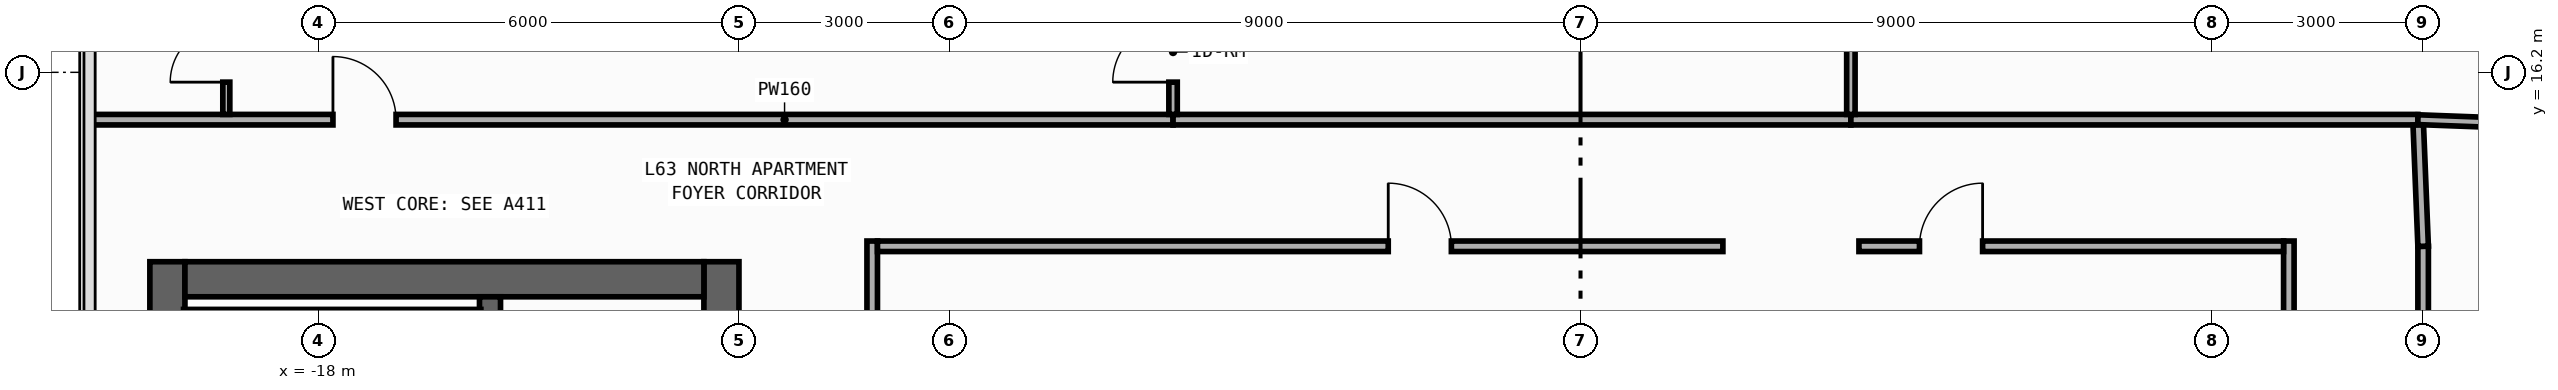
"""IFC4 building model, lengths in metres.
Left out: names, types, materials, properties, quantities, classifications, styles, units other than length and angle.
Written with IfcOpenShell. Run it as: python <this file> out.ifc"""

import sys

from ifc_helpers import new_model, si_unit, direction, frame, frame_2d, origin, place, context, subcontext, project, spatial, rectangle, extrude, element, fill, save


model = new_model("IFC4")
c1 = context("Model", 3, precision=1e-05, world=origin(), true_north=direction((0.0, 1.0)))
c2 = subcontext(c1, "Body", "Model", "MODEL_VIEW")
j1 = project(units=[si_unit("LENGTHUNIT", "METRE"), si_unit("PLANEANGLEUNIT", "RADIAN")], contexts=[c1])
p1 = place(None, origin())
s1 = spatial("IfcSite", under=j1, at=p1, CompositionType="ELEMENT")
p2 = place(p1, origin())
s2 = spatial("IfcBuilding", under=s1, at=p2, CompositionType="ELEMENT")
p3 = place(p2, frame((0.0, 0.0, 265.6)))
s3 = spatial("IfcBuildingStorey", under=s2, at=p3, CompositionType="ELEMENT", Elevation=265.6)
p4 = place(p3, frame((-20.15, -13.5, 0.0), z_axis=(0.0, 0.0, 1.0), x_axis=(0.0, 1.0, 0.0)))
e1 = element("IfcWall", 1, at=p4, inside=s3, PredefinedType="SHEAR", context=c2, shape_type="SweptSolid", body=[
    extrude(rectangle(XDim=27.0, YDim=0.5, at=frame_2d((13.5, 0.0))), origin(), (0.0, 0.0, 1.0), 3.34),
])
p5 = place(p3, frame((-12.25, -13.5, 0.0), z_axis=(0.0, 0.0, 1.0), x_axis=(0.0, 1.0, 0.0)))
e2 = element("IfcWall", 2, at=p5, inside=s3, PredefinedType="SHEAR", context=c2, shape_type="SweptSolid", body=[
    extrude(rectangle(XDim=27.0, YDim=0.5, at=frame_2d((13.5, 0.0))), origin(), (0.0, 0.0, 1.0), 3.34),
])
p6 = place(p5, frame((15.175, 0.0, 0.0)))
e3 = element("IfcOpeningElement", 3, at=p6, cuts=e2, PredefinedType="OPENING", context=c2, shape_type="SweptSolid", body=[
    extrude(rectangle(XDim=0.85, YDim=2.1, at=frame_2d((0.425, 1.05))), frame((0.0, 0.26, 0.0), z_axis=(0.0, -1.0, 0.0), x_axis=(1.0, 0.0, 0.0)), (0.0, 0.0, 1.0), 0.52),
])
p7 = place(p5, frame((21.275, 0.0, 0.0)))
e4 = element("IfcOpeningElement", 4, at=p7, cuts=e2, PredefinedType="OPENING", context=c2, shape_type="SweptSolid", body=[
    extrude(rectangle(XDim=0.85, YDim=2.1, at=frame_2d((0.425, 1.05))), frame((0.0, 0.26, 0.0), z_axis=(0.0, -1.0, 0.0), x_axis=(1.0, 0.0, 0.0)), (0.0, 0.0, 1.0), 0.52),
])
p8 = place(p5, frame((4.275, 0.0, 0.0)))
e5 = element("IfcOpeningElement", 5, at=p8, cuts=e2, PredefinedType="OPENING", context=c2, shape_type="SweptSolid", body=[
    extrude(rectangle(XDim=0.85, YDim=2.1, at=frame_2d((0.425, 1.05))), frame((0.0, 0.26, 0.0), z_axis=(0.0, -1.0, 0.0), x_axis=(1.0, 0.0, 0.0)), (0.0, 0.0, 1.0), 0.52),
])
p9 = place(p5, frame((10.275, 0.0, 0.0)))
e6 = element("IfcOpeningElement", 6, at=p9, cuts=e2, PredefinedType="OPENING", context=c2, shape_type="SweptSolid", body=[
    extrude(rectangle(XDim=0.85, YDim=2.1, at=frame_2d((0.425, 1.05))), frame((0.0, 0.26, 0.0), z_axis=(0.0, -1.0, 0.0), x_axis=(1.0, 0.0, 0.0)), (0.0, 0.0, 1.0), 0.52),
])
p10 = place(p5, frame((12.725, 0.0, 0.0)))
e7 = element("IfcOpeningElement", 7, at=p10, cuts=e2, PredefinedType="OPENING", context=c2, shape_type="SweptSolid", body=[
    extrude(rectangle(XDim=1.15, YDim=2.2, at=frame_2d((0.575, 1.1))), frame((0.0, 0.26, 0.0), z_axis=(0.0, -1.0, 0.0), x_axis=(1.0, 0.0, 0.0)), (0.0, 0.0, 1.0), 0.52),
])
p11 = place(p5, frame((1.625, 0.0, 0.0)))
e8 = element("IfcOpeningElement", 8, at=p11, cuts=e2, PredefinedType="OPENING", context=c2, shape_type="SweptSolid", body=[
    extrude(rectangle(XDim=0.85, YDim=2.1, at=frame_2d((0.425, 1.05))), frame((0.0, 0.26, 0.0), z_axis=(0.0, -1.0, 0.0), x_axis=(1.0, 0.0, 0.0)), (0.0, 0.0, 1.0), 0.52),
])
p12 = place(p3, frame((-19.9, 13.25, 0.0), z_axis=(0.0, 0.0, 1.0), x_axis=(1.0, 0.0, 0.0)))
e9 = element("IfcWall", 9, at=p12, inside=s3, PredefinedType="SHEAR", context=c2, shape_type="SweptSolid", body=[
    extrude(rectangle(XDim=7.4, YDim=0.5, at=frame_2d((3.7, 0.0))), origin(), (0.0, 0.0, 1.0), 3.34),
])
p13 = place(p3, frame((-15.55, -13.0, 0.0), z_axis=(0.0, 0.0, 1.0), x_axis=(0.0, 1.0, 0.0)))
e10 = element("IfcWall", 10, at=p13, inside=s3, PredefinedType="SHEAR", context=c2, shape_type="SweptSolid", body=[
    extrude(rectangle(XDim=26.0, YDim=0.3, at=frame_2d((13.0, 0.0))), origin(), (0.0, 0.0, 1.0), 3.34),
])
p14 = place(p13, frame((12.225, 0.0, 0.0)))
e11 = element("IfcOpeningElement", 11, at=p14, cuts=e10, PredefinedType="OPENING", context=c2, shape_type="SweptSolid", body=[
    extrude(rectangle(XDim=1.15, YDim=2.2, at=frame_2d((0.575, 1.1))), frame((0.0, 0.16, 0.0), z_axis=(0.0, -1.0, 0.0), x_axis=(1.0, 0.0, 0.0)), (0.0, 0.0, 1.0), 0.32),
])
p15 = place(p13, frame((1.125, 0.0, 0.0)))
e12 = element("IfcOpeningElement", 12, at=p15, cuts=e10, PredefinedType="OPENING", context=c2, shape_type="SweptSolid", body=[
    extrude(rectangle(XDim=0.85, YDim=2.1, at=frame_2d((0.425, 1.05))), frame((0.0, 0.16, 0.0), z_axis=(0.0, -1.0, 0.0), x_axis=(1.0, 0.0, 0.0)), (0.0, 0.0, 1.0), 0.32),
])
p16 = place(p3, frame((-19.92, 12.71, 0.0), z_axis=(0.0, 0.0, 1.0), x_axis=(1.0, 0.0, 0.0)))
e13 = element("IfcWall", 13, at=p16, inside=s3, PredefinedType="SHEAR", context=c2, shape_type="SweptSolid", body=[
    extrude(rectangle(XDim=4.24, YDim=0.22, at=frame_2d((2.12, 0.0))), origin(), (0.0, 0.0, 1.0), 3.34),
])
p17 = place(p3, frame((-10.1, 3.79, 0.0), z_axis=(0.0, 0.0, 1.0), x_axis=(0.0, 1.0, 0.0)))
e14 = element("IfcWall", 14, at=p17, inside=s3, PredefinedType="PARTITIONING", context=c2, shape_type="SweptSolid", body=[
    extrude(rectangle(XDim=10.005, YDim=0.15, at=frame_2d((5.002, 0.0))), origin(), (0.0, 0.0, 1.0), 3.34),
])
p18 = place(p17, frame((1.074, 0.0, 0.0)))
e15 = element("IfcOpeningElement", 15, at=p18, cuts=e14, PredefinedType="OPENING", context=c2, shape_type="SweptSolid", body=[
    extrude(rectangle(XDim=0.9, YDim=2.15, at=frame_2d((0.45, 1.075))), frame((0.0, 0.085, 0.0), z_axis=(0.0, -1.0, 0.0), x_axis=(1.0, 0.0, 0.0)), (0.0, 0.0, 1.0), 0.17),
])
p19 = place(p3, frame((12.015, 7.2, 0.0), z_axis=(0.0, 0.0, 1.0), x_axis=(0.0, 1.0, 0.0)))
e16 = element("IfcWall", 16, at=p19, inside=s3, PredefinedType="PARTITIONING", context=c2, shape_type="SweptSolid", body=[
    extrude(rectangle(XDim=6.52, YDim=0.15, at=frame_2d((3.26, 0.0))), origin(), (0.0, 0.0, 1.0), 3.34),
])
p20 = place(p19, frame((0.67, 0.0, 0.0)))
e17 = element("IfcOpeningElement", 17, at=p20, cuts=e16, PredefinedType="OPENING", context=c2, shape_type="SweptSolid", body=[
    extrude(rectangle(XDim=0.9, YDim=2.15, at=frame_2d((0.45, 1.075))), frame((0.0, 0.085, 0.0), z_axis=(0.0, -1.0, 0.0), x_axis=(1.0, 0.0, 0.0)), (0.0, 0.0, 1.0), 0.17),
])
p21 = place(p3, frame((10.1, 3.79, 0.0), z_axis=(0.0, 0.0, 1.0), x_axis=(0.0, 1.0, 0.0)))
e18 = element("IfcWall", 18, at=p21, inside=s3, PredefinedType="PARTITIONING", context=c2, shape_type="SweptSolid", body=[
    extrude(rectangle(XDim=10.005, YDim=0.15, at=frame_2d((5.002, 0.0))), origin(), (0.0, 0.0, 1.0), 3.34),
])
p22 = place(p21, frame((1.074, 0.0, 0.0)))
e19 = element("IfcOpeningElement", 19, at=p22, cuts=e18, PredefinedType="OPENING", context=c2, shape_type="SweptSolid", body=[
    extrude(rectangle(XDim=0.9, YDim=2.15, at=frame_2d((0.45, 1.075))), frame((0.0, 0.085, 0.0), z_axis=(0.0, -1.0, 0.0), x_axis=(1.0, 0.0, 0.0)), (0.0, 0.0, 1.0), 0.17),
])
p23 = place(p3, frame((-21.255, 15.525, 0.0), z_axis=(0.0, 0.0, 1.0), x_axis=(1.0, 0.0, 0.0)))
e20 = element("IfcWall", 20, at=p23, inside=s3, PredefinedType="PARTITIONING", context=c2, shape_type="SweptSolid", body=[
    extrude(rectangle(XDim=15.445, YDim=0.15, at=frame_2d((7.722, 0.0))), origin(), (0.0, 0.0, 1.0), 3.34),
])
p24 = place(p23, frame((3.466, 0.0, 0.0)))
e21 = element("IfcOpeningElement", 21, at=p24, cuts=e20, PredefinedType="OPENING", context=c2, shape_type="SweptSolid", body=[
    extrude(rectangle(XDim=0.9, YDim=2.15, at=frame_2d((0.45, 1.075))), frame((0.0, 0.085, 0.0), z_axis=(0.0, -1.0, 0.0), x_axis=(1.0, 0.0, 0.0)), (0.0, 0.0, 1.0), 0.17),
])
p25 = place(p3, frame((-5.81, 15.525, 0.0), z_axis=(0.0, 0.0, 1.0), x_axis=(1.0, 0.0, 0.0)))
e22 = element("IfcWall", 22, at=p25, inside=s3, PredefinedType="PARTITIONING", context=c2, shape_type="SweptSolid", body=[
    extrude(rectangle(XDim=9.665, YDim=0.15, at=frame_2d((4.833, 0.0))), origin(), (0.0, 0.0, 1.0), 3.34),
])
p26 = place(p3, frame((3.855, 15.525, 0.0), z_axis=(0.0, 0.0, 1.0), x_axis=(1.0, 0.0, 0.0)))
e23 = element("IfcWall", 23, at=p26, inside=s3, PredefinedType="PARTITIONING", context=c2, shape_type="SweptSolid", body=[
    extrude(rectangle(XDim=8.085, YDim=0.15, at=frame_2d((4.042, 0.0))), origin(), (0.0, 0.0, 1.0), 3.34),
])
p27 = place(p3, frame((12.015, 13.72, 0.0), z_axis=(0.0, 0.0, 1.0), x_axis=(-0.040046877756, 0.99919780203, 0.0)))
e24 = element("IfcWall", 24, at=p27, inside=s3, PredefinedType="PARTITIONING", context=c2, shape_type="SweptSolid", body=[
    extrude(rectangle(XDim=1.731, YDim=0.15, at=frame_2d((0.866, 0.0))), origin(), (0.0, 0.0, 1.0), 3.34),
])
p28 = place(p3, frame((-10.025, 13.72, 0.0), z_axis=(0.0, 0.0, 1.0), x_axis=(1.0, 0.0, 0.0)))
e25 = element("IfcWall", 25, at=p28, inside=s3, PredefinedType="PARTITIONING", context=c2, shape_type="SweptSolid", body=[
    extrude(rectangle(XDim=12.055, YDim=0.15, at=frame_2d((6.027, 0.0))), origin(), (0.0, 0.0, 1.0), 3.34),
])
p29 = place(p28, frame((7.283, 0.0, 0.0)))
e26 = element("IfcOpeningElement", 26, at=p29, cuts=e25, PredefinedType="OPENING", context=c2, shape_type="SweptSolid", body=[
    extrude(rectangle(XDim=0.9, YDim=2.15, at=frame_2d((0.45, 1.075))), frame((0.0, 0.085, 0.0), z_axis=(0.0, -1.0, 0.0), x_axis=(1.0, 0.0, 0.0)), (0.0, 0.0, 1.0), 0.17),
])
p30 = place(p3, frame((3.97, 13.72, 0.0), z_axis=(0.0, 0.0, 1.0), x_axis=(1.0, 0.0, 0.0)))
e27 = element("IfcWall", 27, at=p30, inside=s3, PredefinedType="PARTITIONING", context=c2, shape_type="SweptSolid", body=[
    extrude(rectangle(XDim=6.055, YDim=0.15, at=frame_2d((3.027, 0.0))), origin(), (0.0, 0.0, 1.0), 3.34),
])
p31 = place(p30, frame((0.863, 0.0, 0.0)))
e28 = element("IfcOpeningElement", 28, at=p31, cuts=e27, PredefinedType="OPENING", context=c2, shape_type="SweptSolid", body=[
    extrude(rectangle(XDim=0.9, YDim=2.15, at=frame_2d((0.45, 1.075))), frame((0.0, 0.085, 0.0), z_axis=(0.0, -1.0, 0.0), x_axis=(1.0, 0.0, 0.0)), (0.0, 0.0, 1.0), 0.17),
])
p32 = place(p3, frame((-19.31, 15.6, 0.0), z_axis=(0.0, 0.0, 1.0), x_axis=(0.0, 1.0, 0.0)))
e29 = element("IfcWall", 29, at=p32, inside=s3, PredefinedType="PARTITIONING", context=c2, shape_type="SweptSolid", body=[
    extrude(rectangle(XDim=2.5, YDim=0.1, at=frame_2d((1.25, 0.0))), origin(), (0.0, 0.0, 1.0), 3.34),
])
p33 = place(p32, frame((0.46, 0.0, 0.0)))
e30 = element("IfcOpeningElement", 30, at=p33, cuts=e29, PredefinedType="OPENING", context=c2, shape_type="SweptSolid", body=[
    extrude(rectangle(XDim=0.8, YDim=2.1, at=frame_2d((0.4, 1.05))), frame((0.0, 0.06, 0.0), z_axis=(0.0, -1.0, 0.0), x_axis=(1.0, 0.0, 0.0)), (0.0, 0.0, 1.0), 0.12),
])
p34 = place(p3, frame((-5.81, 15.6, 0.0), z_axis=(0.0, 0.0, 1.0), x_axis=(0.0, 1.0, 0.0)))
e31 = element("IfcWall", 31, at=p34, inside=s3, PredefinedType="PARTITIONING", context=c2, shape_type="SweptSolid", body=[
    extrude(rectangle(XDim=4.5, YDim=0.12, at=frame_2d((2.25, 0.0))), origin(), (0.0, 0.0, 1.0), 3.34),
])
p35 = place(p34, frame((0.46, 0.0, 0.0)))
e32 = element("IfcOpeningElement", 32, at=p35, cuts=e31, PredefinedType="OPENING", context=c2, shape_type="SweptSolid", body=[
    extrude(rectangle(XDim=0.86, YDim=2.15, at=frame_2d((0.43, 1.075))), frame((0.0, 0.07, 0.0), z_axis=(0.0, -1.0, 0.0), x_axis=(1.0, 0.0, 0.0)), (0.0, 0.0, 1.0), 0.14),
])
p36 = place(p3, frame((3.855, 15.6, 0.0), z_axis=(0.0, 0.0, 1.0), x_axis=(0.0, 1.0, 0.0)))
e33 = element("IfcWall", 33, at=p36, inside=s3, PredefinedType="PARTITIONING", context=c2, shape_type="SweptSolid", body=[
    extrude(rectangle(XDim=8.455, YDim=0.12, at=frame_2d((4.228, 0.0))), origin(), (0.0, 0.0, 1.0), 3.34),
])
p37 = place(p36, frame((7.195, 0.0, 0.0)))
e34 = element("IfcOpeningElement", 34, at=p37, cuts=e33, PredefinedType="OPENING", context=c2, shape_type="SweptSolid", body=[
    extrude(rectangle(XDim=0.8, YDim=2.1, at=frame_2d((0.4, 1.05))), frame((0.0, 0.07, 0.0), z_axis=(0.0, -1.0, 0.0), x_axis=(1.0, 0.0, 0.0)), (0.0, 0.0, 1.0), 0.14),
])
p38 = place(p3, frame((11.94, 15.525, 0.0), z_axis=(0.0, 0.0, 1.0), x_axis=(0.999304229002, -0.037296888581, 0.0)))
e35 = element("IfcWall", 35, at=p38, inside=s3, PredefinedType="PARTITIONING", context=c2, shape_type="SweptSolid", body=[
    extrude(rectangle(XDim=1.741, YDim=0.14, at=frame_2d((0.871, 0.0))), origin(), (0.0, 0.0, 1.0), 3.34),
])
p39 = place(p24, origin())
e36 = element("IfcDoor", 36, at=p39, inside=s3, OperationType="SINGLE_SWING_LEFT", PredefinedType="DOOR", context=c2, shape_type="SweptSolid", body=[
    extrude(rectangle(XDim=0.9, YDim=2.15, at=frame_2d((0.45, 1.075))), frame((0.0, 0.025, 0.0), z_axis=(0.0, -1.0, 0.0), x_axis=(1.0, 0.0, 0.0)), (0.0, 0.0, 1.0), 0.05),
])
fill(e21, e36)
p40 = place(p29, origin())
e37 = element("IfcDoor", 37, at=p40, inside=s3, OperationType="SINGLE_SWING_LEFT", PredefinedType="DOOR", context=c2, shape_type="SweptSolid", body=[
    extrude(rectangle(XDim=0.9, YDim=2.15, at=frame_2d((0.45, 1.075))), frame((0.0, 0.025, 0.0), z_axis=(0.0, -1.0, 0.0), x_axis=(1.0, 0.0, 0.0)), (0.0, 0.0, 1.0), 0.05),
])
fill(e26, e37)
p41 = place(p31, origin())
e38 = element("IfcDoor", 38, at=p41, inside=s3, OperationType="SINGLE_SWING_RIGHT", PredefinedType="DOOR", context=c2, shape_type="SweptSolid", body=[
    extrude(rectangle(XDim=0.9, YDim=2.15, at=frame_2d((0.45, 1.075))), frame((0.0, 0.025, 0.0), z_axis=(0.0, -1.0, 0.0), x_axis=(1.0, 0.0, 0.0)), (0.0, 0.0, 1.0), 0.05),
])
fill(e28, e38)
p42 = place(p33, origin())
e39 = element("IfcDoor", 39, at=p42, inside=s3, OperationType="SINGLE_SWING_LEFT", PredefinedType="DOOR", context=c2, shape_type="SweptSolid", body=[
    extrude(rectangle(XDim=0.8, YDim=2.1, at=frame_2d((0.4, 1.05))), frame((0.0, 0.025, 0.0), z_axis=(0.0, -1.0, 0.0), x_axis=(1.0, 0.0, 0.0)), (0.0, 0.0, 1.0), 0.05),
])
fill(e30, e39)
p43 = place(p35, origin())
e40 = element("IfcDoor", 40, at=p43, inside=s3, OperationType="SINGLE_SWING_LEFT", PredefinedType="DOOR", context=c2, shape_type="SweptSolid", body=[
    extrude(rectangle(XDim=0.86, YDim=2.15, at=frame_2d((0.43, 1.075))), frame((0.0, 0.025, 0.0), z_axis=(0.0, -1.0, 0.0), x_axis=(1.0, 0.0, 0.0)), (0.0, 0.0, 1.0), 0.05),
])
fill(e32, e40)
save(model, sys.argv[1])
